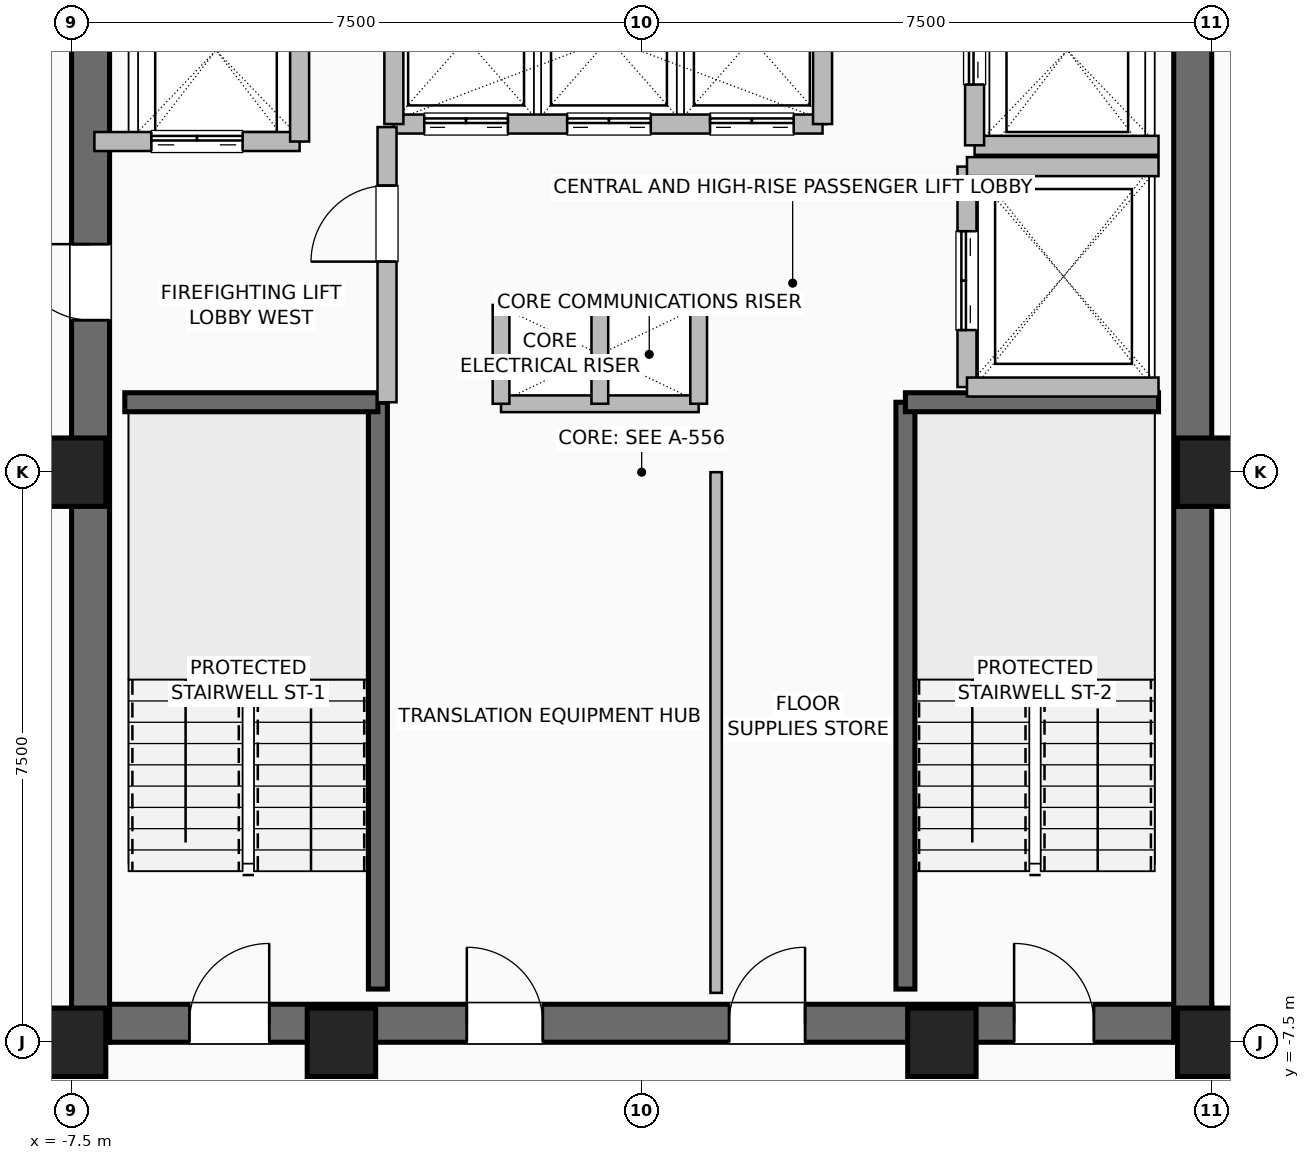
"""IFC4 building model, lengths in metres.
Left out: names, types, materials, properties, quantities, classifications, styles, units other than length and angle.
Written with IfcOpenShell. Run it as: python <this file> out.ifc"""

import sys

from ifc_helpers import new_model, si_unit, direction, frame, frame_2d, origin, origin_2d, place, context, subcontext, project, spatial, rectangle, hollow_rectangle, extrude, element, fill, save


model = new_model("IFC4")
c1 = context("Model", 3, precision=1e-05, world=origin(), true_north=direction((0.0, 1.0)))
c2 = subcontext(c1, "Body", "Model", "MODEL_VIEW")
j1 = project(units=[si_unit("LENGTHUNIT", "METRE"), si_unit("PLANEANGLEUNIT", "RADIAN")], contexts=[c1])
p1 = place(None, origin())
s1 = spatial("IfcSite", under=j1, at=p1, CompositionType="ELEMENT")
p2 = place(p1, origin())
s2 = spatial("IfcBuilding", under=s1, at=p2, CompositionType="ELEMENT")
p3 = place(p2, frame((0.0, 0.0, 223.8)))
s3 = spatial("IfcBuildingStorey", under=s2, at=p3, CompositionType="ELEMENT", Elevation=223.8)
for number, where, z_axis, x_axis in (
    (1, (-7.5, -7.5, 0.0), (0.0, 0.0, 1.0), (1.0, 0.0, 0.0)),
    (2, (-3.95, -7.5, 0.0), (0.0, 0.0, 1.0), (1.0, 0.0, 0.0)),
    (3, (3.95, -7.5, 0.0), (0.0, 0.0, 1.0), (1.0, 0.0, 0.0)),
    (4, (7.5, -7.5, 0.0), (0.0, 0.0, 1.0), (1.0, 0.0, 0.0)),
    (5, (7.5, 0.0, 0.0), (0.0, 0.0, 1.0), (1.0, 0.0, 0.0)),
    (6, (-7.5, 0.0, 0.0), (0.0, 0.0, 1.0), (1.0, 0.0, 0.0)),
):
    element("IfcColumn", number, at=place(p3, frame(where, z_axis=z_axis, x_axis=x_axis)), inside=s3, PredefinedType="COLUMN", context=c2, shape_type="SweptSolid", body=[
        extrude(hollow_rectangle(XDim=0.9, YDim=0.9, WallThickness=0.045, at=origin_2d()), origin(), (0.0, 0.0, 1.0), 3.6),
    ])
p4 = place(p3, frame((-7.5, -7.25, 0.0), z_axis=(0.0, 0.0, 1.0), x_axis=(1.0, 0.0, 0.0)))
e7 = element("IfcWall", 7, at=p4, inside=s3, PredefinedType="SHEAR", context=c2, shape_type="SweptSolid", body=[
    extrude(rectangle(XDim=15.0, YDim=0.5, at=frame_2d((7.5, 0.0))), origin(), (0.0, 0.0, 1.0), 3.25),
])
p5 = place(p4, frame((1.55, 0.0, 0.0)))
e8 = element("IfcOpeningElement", 8, at=p5, cuts=e7, PredefinedType="OPENING", context=c2, shape_type="SweptSolid", body=[
    extrude(rectangle(XDim=1.05, YDim=2.08, at=frame_2d((0.525, 1.04))), frame((0.0, 0.26, 0.0), z_axis=(0.0, -1.0, 0.0), x_axis=(1.0, 0.0, 0.0)), (0.0, 0.0, 1.0), 0.52),
])
p6 = place(p4, frame((12.4, 0.0, 0.0)))
e9 = element("IfcOpeningElement", 9, at=p6, cuts=e7, PredefinedType="OPENING", context=c2, shape_type="SweptSolid", body=[
    extrude(rectangle(XDim=1.05, YDim=2.08, at=frame_2d((0.525, 1.04))), frame((0.0, 0.26, 0.0), z_axis=(0.0, -1.0, 0.0), x_axis=(1.0, 0.0, 0.0)), (0.0, 0.0, 1.0), 0.52),
])
p7 = place(p4, frame((5.2, 0.0, 0.0)))
e10 = element("IfcOpeningElement", 10, at=p7, cuts=e7, PredefinedType="OPENING", context=c2, shape_type="SweptSolid", body=[
    extrude(rectangle(XDim=1.0, YDim=2.08, at=frame_2d((0.5, 1.04))), frame((0.0, 0.26, 0.0), z_axis=(0.0, -1.0, 0.0), x_axis=(1.0, 0.0, 0.0)), (0.0, 0.0, 1.0), 0.52),
])
p8 = place(p4, frame((8.65, 0.0, 0.0)))
e11 = element("IfcOpeningElement", 11, at=p8, cuts=e7, PredefinedType="OPENING", context=c2, shape_type="SweptSolid", body=[
    extrude(rectangle(XDim=1.0, YDim=2.08, at=frame_2d((0.5, 1.04))), frame((0.0, 0.26, 0.0), z_axis=(0.0, -1.0, 0.0), x_axis=(1.0, 0.0, 0.0)), (0.0, 0.0, 1.0), 0.52),
])
p9 = place(p3, frame((-7.25, -7.5, 0.0), z_axis=(0.0, 0.0, 1.0), x_axis=(0.0, 1.0, 0.0)))
e12 = element("IfcWall", 12, at=p9, inside=s3, PredefinedType="SHEAR", context=c2, shape_type="SweptSolid", body=[
    extrude(rectangle(XDim=15.0, YDim=0.5, at=frame_2d((7.5, 0.0))), origin(), (0.0, 0.0, 1.0), 3.25),
])
p10 = place(p9, frame((9.5, 0.0, 0.0)))
e13 = element("IfcOpeningElement", 13, at=p10, cuts=e12, PredefinedType="OPENING", context=c2, shape_type="SweptSolid", body=[
    extrude(rectangle(XDim=1.0, YDim=2.08, at=frame_2d((0.5, 1.04))), frame((0.0, 0.26, 0.0), z_axis=(0.0, -1.0, 0.0), x_axis=(1.0, 0.0, 0.0)), (0.0, 0.0, 1.0), 0.52),
])
p11 = place(p3, frame((7.25, -7.5, 0.0), z_axis=(0.0, 0.0, 1.0), x_axis=(0.0, 1.0, 0.0)))
e14 = element("IfcWall", 14, at=p11, inside=s3, PredefinedType="SHEAR", context=c2, shape_type="SweptSolid", body=[
    extrude(rectangle(XDim=15.0, YDim=0.5, at=frame_2d((7.5, 0.0))), origin(), (0.0, 0.0, 1.0), 3.25),
])
p12 = place(p3, frame((-3.47, -6.8, 0.0), z_axis=(0.0, 0.0, 1.0), x_axis=(0.0, 1.0, 0.0)))
e15 = element("IfcWall", 15, at=p12, inside=s3, PredefinedType="SHEAR", context=c2, shape_type="SweptSolid", body=[
    extrude(rectangle(XDim=7.72, YDim=0.25, at=frame_2d((3.86, 0.0))), origin(), (0.0, 0.0, 1.0), 3.25),
])
p13 = place(p3, frame((-6.8, 0.92, 0.0), z_axis=(0.0, 0.0, 1.0), x_axis=(1.0, 0.0, 0.0)))
e16 = element("IfcWall", 16, at=p13, inside=s3, PredefinedType="SHEAR", context=c2, shape_type="SweptSolid", body=[
    extrude(rectangle(XDim=3.33, YDim=0.25, at=frame_2d((1.665, 0.0))), origin(), (0.0, 0.0, 1.0), 3.25),
])
p14 = place(p3, frame((3.47, -6.8, 0.0), z_axis=(0.0, 0.0, 1.0), x_axis=(0.0, 1.0, 0.0)))
e17 = element("IfcWall", 17, at=p14, inside=s3, PredefinedType="SHEAR", context=c2, shape_type="SweptSolid", body=[
    extrude(rectangle(XDim=7.72, YDim=0.25, at=frame_2d((3.86, 0.0))), origin(), (0.0, 0.0, 1.0), 3.25),
])
p15 = place(p3, frame((3.47, 0.92, 0.0), z_axis=(0.0, 0.0, 1.0), x_axis=(1.0, 0.0, 0.0)))
e18 = element("IfcWall", 18, at=p15, inside=s3, PredefinedType="SHEAR", context=c2, shape_type="SweptSolid", body=[
    extrude(rectangle(XDim=3.33, YDim=0.25, at=frame_2d((1.665, 0.0))), origin(), (0.0, 0.0, 1.0), 3.25),
])
for number, where, z_axis, x_axis in (
    (19, (-1.85, 2.2, 0.0), (0.0, 0.0, 1.0), (1.0, 0.0, 0.0)),
    (20, (-1.85, 0.9, 0.0), (0.0, 0.0, 1.0), (1.0, 0.0, 0.0)),
):
    element("IfcWall", number, at=place(p3, frame(where, z_axis=z_axis, x_axis=x_axis)), inside=s3, PredefinedType="PARTITIONING", context=c2, shape_type="SweptSolid", body=[
        extrude(rectangle(XDim=2.6, YDim=0.22, at=frame_2d((1.3, 0.0))), origin(), (0.0, 0.0, 1.0), 3.25),
    ])
for number, where, z_axis, x_axis in (
    (21, (-0.55, 0.9, 0.0), (0.0, 0.0, 1.0), (0.0, 1.0, 0.0)),
    (22, (0.75, 0.9, 0.0), (0.0, 0.0, 1.0), (0.0, 1.0, 0.0)),
    (23, (-1.85, 0.9, 0.0), (0.0, 0.0, 1.0), (0.0, 1.0, 0.0)),
):
    element("IfcWall", number, at=place(p3, frame(where, z_axis=z_axis, x_axis=x_axis)), inside=s3, PredefinedType="PARTITIONING", context=c2, shape_type="SweptSolid", body=[
        extrude(rectangle(XDim=1.3, YDim=0.22, at=frame_2d((0.65, 0.0))), origin(), (0.0, 0.0, 1.0), 3.25),
    ])
p16 = place(p3, frame((-3.26, 4.58, 0.0), z_axis=(0.0, 0.0, 1.0), x_axis=(1.0, 0.0, 0.0)))
e24 = element("IfcWall", 24, at=p16, inside=s3, PredefinedType="SHEAR", context=c2, shape_type="SweptSolid", body=[
    extrude(rectangle(XDim=5.64, YDim=0.25, at=frame_2d((2.82, 0.0))), origin(), (0.0, 0.0, 1.0), 3.25),
])
p17 = place(p16, frame((0.4, 0.0, 0.0)))
e25 = element("IfcOpeningElement", 25, at=p17, cuts=e24, PredefinedType="OPENING", context=c2, shape_type="SweptSolid", body=[
    extrude(rectangle(XDim=1.1, YDim=2.2, at=frame_2d((0.55, 1.1))), frame((0.0, 0.135, 0.0), z_axis=(0.0, -1.0, 0.0), x_axis=(1.0, 0.0, 0.0)), (0.0, 0.0, 1.0), 0.27),
])
p18 = place(p16, frame((2.28, 0.0, 0.0)))
e26 = element("IfcOpeningElement", 26, at=p18, cuts=e24, PredefinedType="OPENING", context=c2, shape_type="SweptSolid", body=[
    extrude(rectangle(XDim=1.1, YDim=2.2, at=frame_2d((0.55, 1.1))), frame((0.0, 0.135, 0.0), z_axis=(0.0, -1.0, 0.0), x_axis=(1.0, 0.0, 0.0)), (0.0, 0.0, 1.0), 0.27),
])
p19 = place(p16, frame((4.16, 0.0, 0.0)))
e27 = element("IfcOpeningElement", 27, at=p19, cuts=e24, PredefinedType="OPENING", context=c2, shape_type="SweptSolid", body=[
    extrude(rectangle(XDim=1.1, YDim=2.2, at=frame_2d((0.55, 1.1))), frame((0.0, 0.135, 0.0), z_axis=(0.0, -1.0, 0.0), x_axis=(1.0, 0.0, 0.0)), (0.0, 0.0, 1.0), 0.27),
])
for number, where, z_axis, x_axis in (
    (28, (-3.26, 4.58, 0.0), (0.0, 0.0, 1.0), (0.0, 1.0, 0.0)),
    (29, (2.38, 4.58, 0.0), (0.0, 0.0, 1.0), (0.0, 1.0, 0.0)),
):
    element("IfcWall", number, at=place(p3, frame(where, z_axis=z_axis, x_axis=x_axis)), inside=s3, PredefinedType="SHEAR", context=c2, shape_type="SweptSolid", body=[
        extrude(rectangle(XDim=2.22, YDim=0.25, at=frame_2d((1.11, 0.0))), origin(), (0.0, 0.0, 1.0), 3.25),
    ])
p20 = place(p3, frame((-7.2, 4.35, 0.0), z_axis=(0.0, 0.0, 1.0), x_axis=(1.0, 0.0, 0.0)))
e30 = element("IfcWall", 30, at=p20, inside=s3, PredefinedType="SHEAR", context=c2, shape_type="SweptSolid", body=[
    extrude(rectangle(XDim=2.7, YDim=0.25, at=frame_2d((1.35, 0.0))), origin(), (0.0, 0.0, 1.0), 3.25),
])
p21 = place(p20, frame((0.75, 0.0, 0.0)))
e31 = element("IfcOpeningElement", 31, at=p21, cuts=e30, PredefinedType="OPENING", context=c2, shape_type="SweptSolid", body=[
    extrude(rectangle(XDim=1.2, YDim=2.2, at=frame_2d((0.6, 1.1))), frame((0.0, 0.135, 0.0), z_axis=(0.0, -1.0, 0.0), x_axis=(1.0, 0.0, 0.0)), (0.0, 0.0, 1.0), 0.27),
])
p22 = place(p3, frame((-4.5, 4.35, 0.0), z_axis=(0.0, 0.0, 1.0), x_axis=(0.0, 1.0, 0.0)))
e32 = element("IfcWall", 32, at=p22, inside=s3, PredefinedType="SHEAR", context=c2, shape_type="SweptSolid", body=[
    extrude(rectangle(XDim=2.85, YDim=0.25, at=frame_2d((1.425, 0.0))), origin(), (0.0, 0.0, 1.0), 3.25),
])
p23 = place(p3, frame((4.38, 4.3, 0.0), z_axis=(0.0, 0.0, 1.0), x_axis=(1.0, 0.0, 0.0)))
e33 = element("IfcWall", 33, at=p23, inside=s3, PredefinedType="SHEAR", context=c2, shape_type="SweptSolid", body=[
    extrude(rectangle(XDim=2.42, YDim=0.25, at=frame_2d((1.21, 0.0))), origin(), (0.0, 0.0, 1.0), 3.25),
])
p24 = place(p3, frame((4.38, 4.3, 0.0), z_axis=(0.0, 0.0, 1.0), x_axis=(0.0, 1.0, 0.0)))
e34 = element("IfcWall", 34, at=p24, inside=s3, PredefinedType="SHEAR", context=c2, shape_type="SweptSolid", body=[
    extrude(rectangle(XDim=2.5, YDim=0.25, at=frame_2d((1.25, 0.0))), origin(), (0.0, 0.0, 1.0), 3.25),
])
p25 = place(p24, frame((0.8, 0.0, 0.0)))
e35 = element("IfcOpeningElement", 35, at=p25, cuts=e34, PredefinedType="OPENING", context=c2, shape_type="SweptSolid", body=[
    extrude(rectangle(XDim=1.2, YDim=2.2, at=frame_2d((0.6, 1.1))), frame((0.0, 0.135, 0.0), z_axis=(0.0, -1.0, 0.0), x_axis=(1.0, 0.0, 0.0)), (0.0, 0.0, 1.0), 0.27),
])
p26 = place(p3, frame((4.28, 1.12, 0.0), z_axis=(0.0, 0.0, 1.0), x_axis=(0.0, 1.0, 0.0)))
e36 = element("IfcWall", 36, at=p26, inside=s3, PredefinedType="SHEAR", context=c2, shape_type="SweptSolid", body=[
    extrude(rectangle(XDim=2.9, YDim=0.25, at=frame_2d((1.45, 0.0))), origin(), (0.0, 0.0, 1.0), 3.25),
])
p27 = place(p26, frame((0.75, 0.0, 0.0)))
e37 = element("IfcOpeningElement", 37, at=p27, cuts=e36, PredefinedType="OPENING", context=c2, shape_type="SweptSolid", body=[
    extrude(rectangle(XDim=1.3, YDim=2.3, at=frame_2d((0.65, 1.15))), frame((0.0, 0.135, 0.0), z_axis=(0.0, -1.0, 0.0), x_axis=(1.0, 0.0, 0.0)), (0.0, 0.0, 1.0), 0.27),
])
for number, where, z_axis, x_axis in (
    (38, (4.28, 1.12, 0.0), (0.0, 0.0, 1.0), (1.0, 0.0, 0.0)),
    (39, (4.28, 4.02, 0.0), (0.0, 0.0, 1.0), (1.0, 0.0, 0.0)),
):
    element("IfcWall", number, at=place(p3, frame(where, z_axis=z_axis, x_axis=x_axis)), inside=s3, PredefinedType="SHEAR", context=c2, shape_type="SweptSolid", body=[
        extrude(rectangle(XDim=2.52, YDim=0.25, at=frame_2d((1.26, 0.0))), origin(), (0.0, 0.0, 1.0), 3.25),
    ])
p28 = place(p3, frame((-3.35, 0.92, 0.0), z_axis=(0.0, 0.0, 1.0), x_axis=(0.0, 1.0, 0.0)))
e40 = element("IfcWall", 40, at=p28, inside=s3, PredefinedType="SHEAR", context=c2, shape_type="SweptSolid", body=[
    extrude(rectangle(XDim=3.62, YDim=0.25, at=frame_2d((1.81, 0.0))), origin(), (0.0, 0.0, 1.0), 3.25),
])
p29 = place(p28, frame((1.85, 0.0, 0.0)))
e41 = element("IfcOpeningElement", 41, at=p29, cuts=e40, PredefinedType="OPENING", context=c2, shape_type="SweptSolid", body=[
    extrude(rectangle(XDim=1.0, YDim=2.08, at=frame_2d((0.5, 1.04))), frame((0.0, 0.135, 0.0), z_axis=(0.0, -1.0, 0.0), x_axis=(1.0, 0.0, 0.0)), (0.0, 0.0, 1.0), 0.27),
])
p30 = place(p3, frame((0.98, -6.85, 0.0), z_axis=(0.0, 0.0, 1.0), x_axis=(0.0, 1.0, 0.0)))
e42 = element("IfcWall", 42, at=p30, inside=s3, PredefinedType="PARTITIONING", context=c2, shape_type="SweptSolid", body=[
    extrude(rectangle(XDim=6.85, YDim=0.15, at=frame_2d((3.425, 0.0))), origin(), (0.0, 0.0, 1.0), 3.25),
])
p31 = place(p3, frame((7.45, -7.48, 0.0), z_axis=(0.0, 0.0, 1.0), x_axis=(1.0, 0.0, 0.0)))
e43 = element("IfcWall", 43, at=p31, inside=s3, PredefinedType="PARTITIONING", context=c2, shape_type="SweptSolid", body=[
    extrude(rectangle(XDim=0.95, YDim=0.15, at=frame_2d((0.475, 0.0))), origin(), (0.0, 0.0, 1.0), 3.25),
])
p32 = place(p5, origin())
e44 = element("IfcDoor", 44, at=p32, inside=s3, OperationType="SINGLE_SWING_RIGHT", PredefinedType="DOOR", context=c2, shape_type="SweptSolid", body=[
    extrude(rectangle(XDim=1.05, YDim=2.08, at=frame_2d((0.525, 1.04))), frame((0.0, 0.025, 0.0), z_axis=(0.0, -1.0, 0.0), x_axis=(1.0, 0.0, 0.0)), (0.0, 0.0, 1.0), 0.05),
])
fill(e8, e44)
p33 = place(p6, origin())
e45 = element("IfcDoor", 45, at=p33, inside=s3, OperationType="SINGLE_SWING_LEFT", PredefinedType="DOOR", context=c2, shape_type="SweptSolid", body=[
    extrude(rectangle(XDim=1.05, YDim=2.08, at=frame_2d((0.525, 1.04))), frame((0.0, 0.025, 0.0), z_axis=(0.0, -1.0, 0.0), x_axis=(1.0, 0.0, 0.0)), (0.0, 0.0, 1.0), 0.05),
])
fill(e9, e45)
p34 = place(p10, origin())
e46 = element("IfcDoor", 46, at=p34, inside=s3, OperationType="SINGLE_SWING_RIGHT", PredefinedType="DOOR", context=c2, shape_type="SweptSolid", body=[
    extrude(rectangle(XDim=1.0, YDim=2.08, at=frame_2d((0.5, 1.04))), frame((0.0, 0.025, 0.0), z_axis=(0.0, -1.0, 0.0), x_axis=(1.0, 0.0, 0.0)), (0.0, 0.0, 1.0), 0.05),
])
fill(e13, e46)
p35 = place(p7, origin())
e47 = element("IfcDoor", 47, at=p35, inside=s3, OperationType="SINGLE_SWING_LEFT", PredefinedType="DOOR", context=c2, shape_type="SweptSolid", body=[
    extrude(rectangle(XDim=1.0, YDim=2.08, at=frame_2d((0.5, 1.04))), frame((0.0, 0.025, 0.0), z_axis=(0.0, -1.0, 0.0), x_axis=(1.0, 0.0, 0.0)), (0.0, 0.0, 1.0), 0.05),
])
fill(e10, e47)
p36 = place(p8, origin())
e48 = element("IfcDoor", 48, at=p36, inside=s3, OperationType="SINGLE_SWING_RIGHT", PredefinedType="DOOR", context=c2, shape_type="SweptSolid", body=[
    extrude(rectangle(XDim=1.0, YDim=2.08, at=frame_2d((0.5, 1.04))), frame((0.0, 0.025, 0.0), z_axis=(0.0, -1.0, 0.0), x_axis=(1.0, 0.0, 0.0)), (0.0, 0.0, 1.0), 0.05),
])
fill(e11, e48)
p37 = place(p17, origin())
e49 = element("IfcDoor", 49, at=p37, inside=s3, OperationType="DOUBLE_DOOR_SLIDING", PredefinedType="DOOR", context=c2, shape_type="SweptSolid", body=[
    extrude(rectangle(XDim=1.1, YDim=2.2, at=frame_2d((0.55, 1.1))), frame((0.0, 0.025, 0.0), z_axis=(0.0, -1.0, 0.0), x_axis=(1.0, 0.0, 0.0)), (0.0, 0.0, 1.0), 0.05),
])
fill(e25, e49)
p38 = place(p18, origin())
e50 = element("IfcDoor", 50, at=p38, inside=s3, OperationType="DOUBLE_DOOR_SLIDING", PredefinedType="DOOR", context=c2, shape_type="SweptSolid", body=[
    extrude(rectangle(XDim=1.1, YDim=2.2, at=frame_2d((0.55, 1.1))), frame((0.0, 0.025, 0.0), z_axis=(0.0, -1.0, 0.0), x_axis=(1.0, 0.0, 0.0)), (0.0, 0.0, 1.0), 0.05),
])
fill(e26, e50)
p39 = place(p19, origin())
e51 = element("IfcDoor", 51, at=p39, inside=s3, OperationType="DOUBLE_DOOR_SLIDING", PredefinedType="DOOR", context=c2, shape_type="SweptSolid", body=[
    extrude(rectangle(XDim=1.1, YDim=2.2, at=frame_2d((0.55, 1.1))), frame((0.0, 0.025, 0.0), z_axis=(0.0, -1.0, 0.0), x_axis=(1.0, 0.0, 0.0)), (0.0, 0.0, 1.0), 0.05),
])
fill(e27, e51)
p40 = place(p21, origin())
e52 = element("IfcDoor", 52, at=p40, inside=s3, OperationType="DOUBLE_DOOR_SLIDING", PredefinedType="DOOR", context=c2, shape_type="SweptSolid", body=[
    extrude(rectangle(XDim=1.2, YDim=2.2, at=frame_2d((0.6, 1.1))), frame((0.0, 0.025, 0.0), z_axis=(0.0, -1.0, 0.0), x_axis=(1.0, 0.0, 0.0)), (0.0, 0.0, 1.0), 0.05),
])
fill(e31, e52)
p41 = place(p25, origin())
e53 = element("IfcDoor", 53, at=p41, inside=s3, OperationType="DOUBLE_DOOR_SLIDING", PredefinedType="DOOR", context=c2, shape_type="SweptSolid", body=[
    extrude(rectangle(XDim=1.2, YDim=2.2, at=frame_2d((0.6, 1.1))), frame((0.0, 0.025, 0.0), z_axis=(0.0, -1.0, 0.0), x_axis=(1.0, 0.0, 0.0)), (0.0, 0.0, 1.0), 0.05),
])
fill(e35, e53)
p42 = place(p27, origin())
e54 = element("IfcDoor", 54, at=p42, inside=s3, OperationType="DOUBLE_DOOR_SLIDING", PredefinedType="DOOR", context=c2, shape_type="SweptSolid", body=[
    extrude(rectangle(XDim=1.3, YDim=2.3, at=frame_2d((0.65, 1.15))), frame((0.0, 0.025, 0.0), z_axis=(0.0, -1.0, 0.0), x_axis=(1.0, 0.0, 0.0)), (0.0, 0.0, 1.0), 0.05),
])
fill(e37, e54)
p43 = place(p29, origin())
e55 = element("IfcDoor", 55, at=p43, inside=s3, OperationType="SINGLE_SWING_LEFT", PredefinedType="DOOR", context=c2, shape_type="SweptSolid", body=[
    extrude(rectangle(XDim=1.0, YDim=2.08, at=frame_2d((0.5, 1.04))), frame((0.0, 0.025, 0.0), z_axis=(0.0, -1.0, 0.0), x_axis=(1.0, 0.0, 0.0)), (0.0, 0.0, 1.0), 0.05),
])
fill(e41, e55)
save(model, sys.argv[1])
